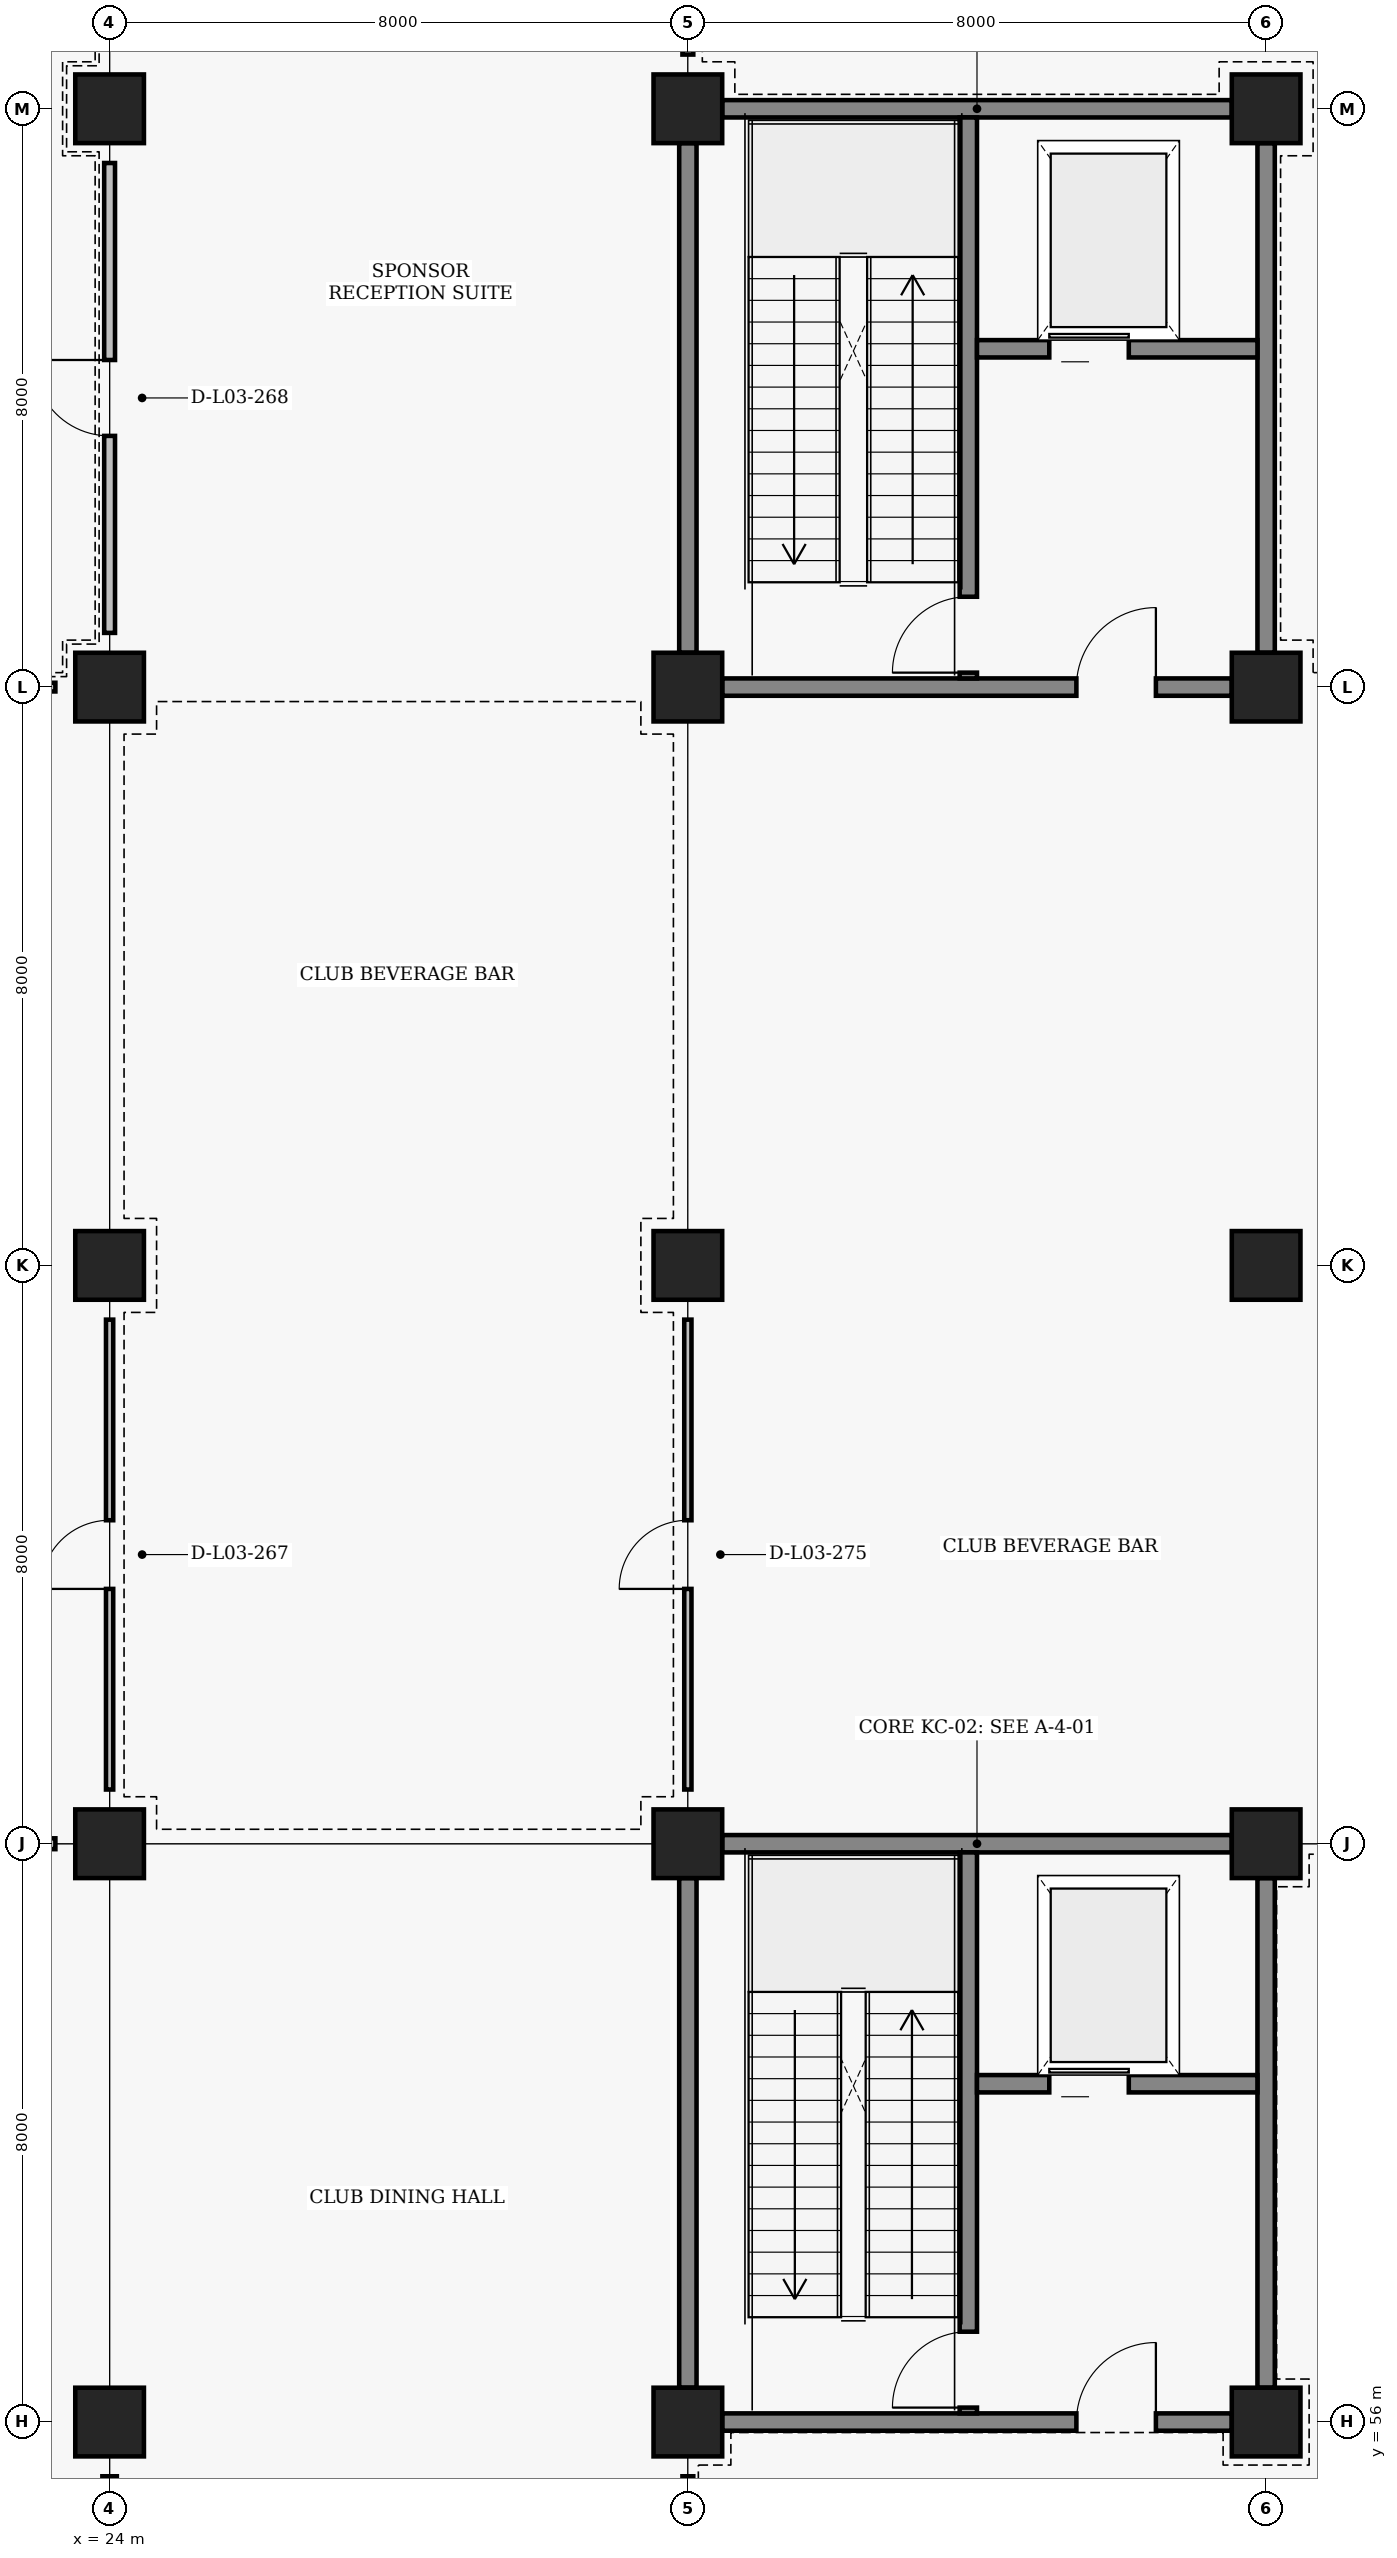
"""IFC4 building model, lengths in metres.
Left out: names, types, materials, properties, quantities, classifications, styles, units other than length and angle.
Written with IfcOpenShell. Run it as: python <this file> out.ifc"""

import sys

from ifc_helpers import new_model, si_unit, direction, frame, frame_2d, origin, origin_2d, place, context, subcontext, project, spatial, rectangle, extrude, element, fill, save


model = new_model("IFC4")
c1 = context("Model", 3, precision=1e-05, world=origin(), true_north=direction((0.0, 1.0)))
c2 = subcontext(c1, "Body", "Model", "MODEL_VIEW")
j1 = project(units=[si_unit("LENGTHUNIT", "METRE"), si_unit("PLANEANGLEUNIT", "RADIAN")], contexts=[c1])
p1 = place(None, origin())
s1 = spatial("IfcSite", under=j1, at=p1, CompositionType="ELEMENT")
p2 = place(p1, origin())
s2 = spatial("IfcBuilding", under=s1, at=p2, CompositionType="ELEMENT")
p3 = place(p2, frame((0.0, 0.0, 9.6)))
s3 = spatial("IfcBuildingStorey", under=s2, at=p3, CompositionType="ELEMENT", Elevation=9.6)
for number, where, z_axis, x_axis in (
    (1, (24.0, 56.0, 0.0), (0.0, 0.0, 1.0), (1.0, 0.0, 0.0)),
    (2, (24.0, 64.0, 0.0), (0.0, 0.0, 1.0), (1.0, 0.0, 0.0)),
    (3, (24.0, 72.0, 0.0), (0.0, 0.0, 1.0), (1.0, 0.0, 0.0)),
    (4, (24.0, 80.0, 0.0), (0.0, 0.0, 1.0), (1.0, 0.0, 0.0)),
    (5, (24.0, 88.0, 0.0), (0.0, 0.0, 1.0), (1.0, 0.0, 0.0)),
    (6, (32.0, 56.0, 0.0), (0.0, 0.0, 1.0), (1.0, 0.0, 0.0)),
    (7, (32.0, 64.0, 0.0), (0.0, 0.0, 1.0), (1.0, 0.0, 0.0)),
    (8, (32.0, 72.0, 0.0), (0.0, 0.0, 1.0), (1.0, 0.0, 0.0)),
    (9, (32.0, 80.0, 0.0), (0.0, 0.0, 1.0), (1.0, 0.0, 0.0)),
    (10, (32.0, 88.0, 0.0), (0.0, 0.0, 1.0), (1.0, 0.0, 0.0)),
    (11, (40.0, 56.0, 0.0), (0.0, 0.0, 1.0), (1.0, 0.0, 0.0)),
    (12, (40.0, 64.0, 0.0), (0.0, 0.0, 1.0), (1.0, 0.0, 0.0)),
    (13, (40.0, 72.0, 0.0), (0.0, 0.0, 1.0), (1.0, 0.0, 0.0)),
    (14, (40.0, 80.0, 0.0), (0.0, 0.0, 1.0), (1.0, 0.0, 0.0)),
    (15, (40.0, 88.0, 0.0), (0.0, 0.0, 1.0), (1.0, 0.0, 0.0)),
):
    element("IfcColumn", number, at=place(p3, frame(where, z_axis=z_axis, x_axis=x_axis)), inside=s3, PredefinedType="COLUMN", context=c2, shape_type="SweptSolid", body=[
        extrude(rectangle(XDim=0.95, YDim=0.95, at=origin_2d()), origin(), (0.0, 0.0, 1.0), 4.8),
    ])
p4 = place(p3, frame((32.475, 56.0, 0.0), z_axis=(0.0, 0.0, 1.0), x_axis=(1.0, 0.0, 0.0)))
e16 = element("IfcWall", 16, at=p4, inside=s3, PredefinedType="SHEAR", context=c2, shape_type="SweptSolid", body=[
    extrude(rectangle(XDim=7.05, YDim=0.24, at=frame_2d((3.525, 0.0))), origin(), (0.0, 0.0, 1.0), 3.93),
])
p5 = place(p4, frame((4.9, 0.0, 0.0)))
e17 = element("IfcOpeningElement", 17, at=p5, cuts=e16, PredefinedType="OPENING", context=c2, shape_type="SweptSolid", body=[
    extrude(rectangle(XDim=1.1, YDim=2.2, at=frame_2d((0.55, 1.1))), frame((0.0, 0.13, 0.0), z_axis=(0.0, -1.0, 0.0), x_axis=(1.0, 0.0, 0.0)), (0.0, 0.0, 1.0), 0.26),
])
for number, where, z_axis, x_axis in (
    (18, (32.475, 64.0, 0.0), (0.0, 0.0, 1.0), (1.0, 0.0, 0.0)),
    (19, (32.0, 56.475, 0.0), (0.0, 0.0, 1.0), (0.0, 1.0, 0.0)),
    (20, (40.0, 56.475, 0.0), (0.0, 0.0, 1.0), (0.0, 1.0, 0.0)),
):
    element("IfcWall", number, at=place(p3, frame(where, z_axis=z_axis, x_axis=x_axis)), inside=s3, PredefinedType="SHEAR", context=c2, shape_type="SweptSolid", body=[
        extrude(rectangle(XDim=7.05, YDim=0.24, at=frame_2d((3.525, 0.0))), origin(), (0.0, 0.0, 1.0), 3.93),
    ])
p6 = place(p3, frame((35.88, 56.12, 0.0), z_axis=(0.0, 0.0, 1.0), x_axis=(0.0, 1.0, 0.0)))
e21 = element("IfcWall", 21, at=p6, inside=s3, PredefinedType="SHEAR", context=c2, shape_type="SweptSolid", body=[
    extrude(rectangle(XDim=7.76, YDim=0.24, at=frame_2d((3.88, 0.0))), origin(), (0.0, 0.0, 1.0), 4.03),
])
p7 = place(p6, frame((0.08, 0.0, 0.0)))
e22 = element("IfcOpeningElement", 22, at=p7, cuts=e21, PredefinedType="OPENING", context=c2, shape_type="SweptSolid", body=[
    extrude(rectangle(XDim=1.05, YDim=2.15, at=frame_2d((0.525, 1.075))), frame((0.0, 0.13, 0.0), z_axis=(0.0, -1.0, 0.0), x_axis=(1.0, 0.0, 0.0)), (0.0, 0.0, 1.0), 0.26),
])
p8 = place(p3, frame((36.0, 60.68, 0.0), z_axis=(0.0, 0.0, 1.0), x_axis=(1.0, 0.0, 0.0)))
e23 = element("IfcWall", 23, at=p8, inside=s3, PredefinedType="SHEAR", context=c2, shape_type="SweptSolid", body=[
    extrude(rectangle(XDim=3.88, YDim=0.24, at=frame_2d((1.94, 0.0))), origin(), (0.0, 0.0, 1.0), 3.93),
])
p9 = place(p8, frame((1.0, 0.0, 0.0)))
e24 = element("IfcOpeningElement", 24, at=p9, cuts=e23, PredefinedType="OPENING", context=c2, shape_type="SweptSolid", body=[
    extrude(rectangle(XDim=1.1, YDim=2.15, at=frame_2d((0.55, 1.075))), frame((0.0, 0.13, 0.0), z_axis=(0.0, -1.0, 0.0), x_axis=(1.0, 0.0, 0.0)), (0.0, 0.0, 1.0), 0.26),
])
p10 = place(p3, frame((32.475, 80.0, 0.0), z_axis=(0.0, 0.0, 1.0), x_axis=(1.0, 0.0, 0.0)))
e25 = element("IfcWall", 25, at=p10, inside=s3, PredefinedType="SHEAR", context=c2, shape_type="SweptSolid", body=[
    extrude(rectangle(XDim=7.05, YDim=0.24, at=frame_2d((3.525, 0.0))), origin(), (0.0, 0.0, 1.0), 3.93),
])
p11 = place(p10, frame((4.9, 0.0, 0.0)))
e26 = element("IfcOpeningElement", 26, at=p11, cuts=e25, PredefinedType="OPENING", context=c2, shape_type="SweptSolid", body=[
    extrude(rectangle(XDim=1.1, YDim=2.2, at=frame_2d((0.55, 1.1))), frame((0.0, 0.13, 0.0), z_axis=(0.0, -1.0, 0.0), x_axis=(1.0, 0.0, 0.0)), (0.0, 0.0, 1.0), 0.26),
])
p12 = place(p3, frame((32.475, 88.0, 0.0), z_axis=(0.0, 0.0, 1.0), x_axis=(1.0, 0.0, 0.0)))
e27 = element("IfcWall", 27, at=p12, inside=s3, PredefinedType="SHEAR", context=c2, shape_type="SweptSolid", body=[
    extrude(rectangle(XDim=7.05, YDim=0.24, at=frame_2d((3.525, 0.0))), origin(), (0.0, 0.0, 1.0), 3.68),
])
p13 = place(p3, frame((32.0, 80.475, 0.0), z_axis=(0.0, 0.0, 1.0), x_axis=(0.0, 1.0, 0.0)))
e28 = element("IfcWall", 28, at=p13, inside=s3, PredefinedType="SHEAR", context=c2, shape_type="SweptSolid", body=[
    extrude(rectangle(XDim=7.05, YDim=0.24, at=frame_2d((3.525, 0.0))), origin(), (0.0, 0.0, 1.0), 3.93),
])
p14 = place(p3, frame((40.0, 80.475, 0.0), z_axis=(0.0, 0.0, 1.0), x_axis=(0.0, 1.0, 0.0)))
e29 = element("IfcWall", 29, at=p14, inside=s3, PredefinedType="SHEAR", context=c2, shape_type="SweptSolid", body=[
    extrude(rectangle(XDim=7.05, YDim=0.24, at=frame_2d((3.525, 0.0))), origin(), (0.0, 0.0, 1.0), 3.68),
])
p15 = place(p3, frame((35.88, 80.12, 0.0), z_axis=(0.0, 0.0, 1.0), x_axis=(0.0, 1.0, 0.0)))
e30 = element("IfcWall", 30, at=p15, inside=s3, PredefinedType="SHEAR", context=c2, shape_type="SweptSolid", body=[
    extrude(rectangle(XDim=7.76, YDim=0.24, at=frame_2d((3.88, 0.0))), origin(), (0.0, 0.0, 1.0), 4.03),
])
p16 = place(p15, frame((0.08, 0.0, 0.0)))
e31 = element("IfcOpeningElement", 31, at=p16, cuts=e30, PredefinedType="OPENING", context=c2, shape_type="SweptSolid", body=[
    extrude(rectangle(XDim=1.05, YDim=2.15, at=frame_2d((0.525, 1.075))), frame((0.0, 0.13, 0.0), z_axis=(0.0, -1.0, 0.0), x_axis=(1.0, 0.0, 0.0)), (0.0, 0.0, 1.0), 0.26),
])
p17 = place(p3, frame((36.0, 84.68, 0.0), z_axis=(0.0, 0.0, 1.0), x_axis=(1.0, 0.0, 0.0)))
e32 = element("IfcWall", 32, at=p17, inside=s3, PredefinedType="SHEAR", context=c2, shape_type="SweptSolid", body=[
    extrude(rectangle(XDim=3.88, YDim=0.24, at=frame_2d((1.94, 0.0))), origin(), (0.0, 0.0, 1.0), 3.93),
])
p18 = place(p17, frame((1.0, 0.0, 0.0)))
e33 = element("IfcOpeningElement", 33, at=p18, cuts=e32, PredefinedType="OPENING", context=c2, shape_type="SweptSolid", body=[
    extrude(rectangle(XDim=1.1, YDim=2.15, at=frame_2d((0.55, 1.075))), frame((0.0, 0.13, 0.0), z_axis=(0.0, -1.0, 0.0), x_axis=(1.0, 0.0, 0.0)), (0.0, 0.0, 1.0), 0.26),
])
p19 = place(p3, frame((24.0, 48.75, 0.0), z_axis=(0.0, 0.0, 1.0), x_axis=(0.0, 1.0, 0.0)))
e34 = element("IfcWall", 34, at=p19, inside=s3, PredefinedType="PARTITIONING", context=c2, shape_type="SweptSolid", body=[
    extrude(rectangle(XDim=6.5, YDim=0.2, at=frame_2d((3.25, 0.0))), origin(), (0.0, 0.0, 1.0), 3.93),
])
p20 = place(p3, frame((32.0, 48.75, 0.0), z_axis=(0.0, 0.0, 1.0), x_axis=(0.0, 1.0, 0.0)))
e35 = element("IfcWall", 35, at=p20, inside=s3, PredefinedType="PARTITIONING", context=c2, shape_type="SweptSolid", body=[
    extrude(rectangle(XDim=6.5, YDim=0.15, at=frame_2d((3.25, 0.0))), origin(), (0.0, 0.0, 1.0), 3.93),
])
p21 = place(p20, frame((2.35, 0.0, 0.0)))
e36 = element("IfcOpeningElement", 36, at=p21, cuts=e35, PredefinedType="OPENING", context=c2, shape_type="SweptSolid", body=[
    extrude(rectangle(XDim=1.8, YDim=2.3, at=frame_2d((0.9, 1.15))), frame((0.0, 0.085, 0.0), z_axis=(0.0, -1.0, 0.0), x_axis=(1.0, 0.0, 0.0)), (0.0, 0.0, 1.0), 0.17),
])
p22 = place(p3, frame((24.0, 64.75, 0.0), z_axis=(0.0, 0.0, 1.0), x_axis=(0.0, 1.0, 0.0)))
e37 = element("IfcWall", 37, at=p22, inside=s3, PredefinedType="PARTITIONING", context=c2, shape_type="SweptSolid", body=[
    extrude(rectangle(XDim=6.5, YDim=0.1, at=frame_2d((3.25, 0.0))), origin(), (0.0, 0.0, 1.0), 3.93),
])
p23 = place(p22, frame((2.775, 0.0, 0.0)))
e38 = element("IfcOpeningElement", 38, at=p23, cuts=e37, PredefinedType="OPENING", context=c2, shape_type="SweptSolid", body=[
    extrude(rectangle(XDim=0.95, YDim=2.1, at=frame_2d((0.475, 1.05))), frame((0.0, 0.06, 0.0), z_axis=(0.0, -1.0, 0.0), x_axis=(1.0, 0.0, 0.0)), (0.0, 0.0, 1.0), 0.12),
])
p24 = place(p3, frame((24.0, 80.75, 0.0), z_axis=(0.0, 0.0, 1.0), x_axis=(0.0, 1.0, 0.0)))
e39 = element("IfcWall", 39, at=p24, inside=s3, PredefinedType="PARTITIONING", context=c2, shape_type="SweptSolid", body=[
    extrude(rectangle(XDim=6.5, YDim=0.15, at=frame_2d((3.25, 0.0))), origin(), (0.0, 0.0, 1.0), 3.93),
])
p25 = place(p24, frame((2.725, 0.0, 0.0)))
e40 = element("IfcOpeningElement", 40, at=p25, cuts=e39, PredefinedType="OPENING", context=c2, shape_type="SweptSolid", body=[
    extrude(rectangle(XDim=1.05, YDim=2.15, at=frame_2d((0.525, 1.075))), frame((0.0, 0.085, 0.0), z_axis=(0.0, -1.0, 0.0), x_axis=(1.0, 0.0, 0.0)), (0.0, 0.0, 1.0), 0.17),
])
p26 = place(p3, frame((32.0, 64.75, 0.0), z_axis=(0.0, 0.0, 1.0), x_axis=(0.0, 1.0, 0.0)))
e41 = element("IfcWall", 41, at=p26, inside=s3, PredefinedType="PARTITIONING", context=c2, shape_type="SweptSolid", body=[
    extrude(rectangle(XDim=6.5, YDim=0.1, at=frame_2d((3.25, 0.0))), origin(), (0.0, 0.0, 1.0), 3.93),
])
p27 = place(p26, frame((2.775, 0.0, 0.0)))
e42 = element("IfcOpeningElement", 42, at=p27, cuts=e41, PredefinedType="OPENING", context=c2, shape_type="SweptSolid", body=[
    extrude(rectangle(XDim=0.95, YDim=2.1, at=frame_2d((0.475, 1.05))), frame((0.0, 0.06, 0.0), z_axis=(0.0, -1.0, 0.0), x_axis=(1.0, 0.0, 0.0)), (0.0, 0.0, 1.0), 0.12),
])
p28 = place(p3, frame((32.0, 88.75, 0.0), z_axis=(0.0, 0.0, 1.0), x_axis=(0.0, 1.0, 0.0)))
e43 = element("IfcWall", 43, at=p28, inside=s3, PredefinedType="PARTITIONING", context=c2, shape_type="SweptSolid", body=[
    extrude(rectangle(XDim=6.5, YDim=0.15, at=frame_2d((3.25, 0.0))), origin(), (0.0, 0.0, 1.0), 3.93),
])
p29 = place(p28, frame((2.725, 0.0, 0.0)))
e44 = element("IfcOpeningElement", 44, at=p29, cuts=e43, PredefinedType="OPENING", context=c2, shape_type="SweptSolid", body=[
    extrude(rectangle(XDim=1.05, YDim=2.15, at=frame_2d((0.525, 1.075))), frame((0.0, 0.085, 0.0), z_axis=(0.0, -1.0, 0.0), x_axis=(1.0, 0.0, 0.0)), (0.0, 0.0, 1.0), 0.17),
])
p30 = place(p3, frame((16.75, 64.0, 0.0), z_axis=(0.0, 0.0, 1.0), x_axis=(1.0, 0.0, 0.0)))
e45 = element("IfcWall", 45, at=p30, inside=s3, PredefinedType="PARTITIONING", context=c2, shape_type="SweptSolid", body=[
    extrude(rectangle(XDim=6.5, YDim=0.15, at=frame_2d((3.25, 0.0))), origin(), (0.0, 0.0, 1.0), 3.97),
])
p31 = place(p30, frame((2.675, 0.0, 0.0)))
e46 = element("IfcOpeningElement", 46, at=p31, cuts=e45, PredefinedType="OPENING", context=c2, shape_type="SweptSolid", body=[
    extrude(rectangle(XDim=1.15, YDim=2.15, at=frame_2d((0.575, 1.075))), frame((0.0, 0.085, 0.0), z_axis=(0.0, -1.0, 0.0), x_axis=(1.0, 0.0, 0.0)), (0.0, 0.0, 1.0), 0.17),
])
p32 = place(p3, frame((16.75, 80.0, 0.0), z_axis=(0.0, 0.0, 1.0), x_axis=(1.0, 0.0, 0.0)))
e47 = element("IfcWall", 47, at=p32, inside=s3, PredefinedType="PARTITIONING", context=c2, shape_type="SweptSolid", body=[
    extrude(rectangle(XDim=6.5, YDim=0.12, at=frame_2d((3.25, 0.0))), origin(), (0.0, 0.0, 1.0), 3.97),
])
p33 = place(p32, frame((2.75, 0.0, 0.0)))
e48 = element("IfcOpeningElement", 48, at=p33, cuts=e47, PredefinedType="OPENING", context=c2, shape_type="SweptSolid", body=[
    extrude(rectangle(XDim=1.0, YDim=2.1, at=frame_2d((0.5, 1.05))), frame((0.0, 0.07, 0.0), z_axis=(0.0, -1.0, 0.0), x_axis=(1.0, 0.0, 0.0)), (0.0, 0.0, 1.0), 0.14),
])
p34 = place(p5, origin())
e49 = element("IfcDoor", 49, at=p34, inside=s3, OperationType="SINGLE_SWING_RIGHT", PredefinedType="DOOR", context=c2, shape_type="SweptSolid", body=[
    extrude(rectangle(XDim=1.1, YDim=2.2, at=frame_2d((0.55, 1.1))), frame((0.0, 0.025, 0.0), z_axis=(0.0, -1.0, 0.0), x_axis=(1.0, 0.0, 0.0)), (0.0, 0.0, 1.0), 0.05),
])
fill(e17, e49)
p35 = place(p7, origin())
e50 = element("IfcDoor", 50, at=p35, inside=s3, OperationType="SINGLE_SWING_LEFT", PredefinedType="DOOR", context=c2, shape_type="SweptSolid", body=[
    extrude(rectangle(XDim=1.05, YDim=2.15, at=frame_2d((0.525, 1.075))), frame((0.0, 0.025, 0.0), z_axis=(0.0, -1.0, 0.0), x_axis=(1.0, 0.0, 0.0)), (0.0, 0.0, 1.0), 0.05),
])
fill(e22, e50)
p36 = place(p9, origin())
e51 = element("IfcDoor", 51, at=p36, inside=s3, OperationType="SLIDING_TO_LEFT", PredefinedType="DOOR", context=c2, shape_type="SweptSolid", body=[
    extrude(rectangle(XDim=1.1, YDim=2.15, at=frame_2d((0.55, 1.075))), frame((0.0, 0.025, 0.0), z_axis=(0.0, -1.0, 0.0), x_axis=(1.0, 0.0, 0.0)), (0.0, 0.0, 1.0), 0.05),
])
fill(e24, e51)
p37 = place(p11, origin())
e52 = element("IfcDoor", 52, at=p37, inside=s3, OperationType="SINGLE_SWING_RIGHT", PredefinedType="DOOR", context=c2, shape_type="SweptSolid", body=[
    extrude(rectangle(XDim=1.1, YDim=2.2, at=frame_2d((0.55, 1.1))), frame((0.0, 0.025, 0.0), z_axis=(0.0, -1.0, 0.0), x_axis=(1.0, 0.0, 0.0)), (0.0, 0.0, 1.0), 0.05),
])
fill(e26, e52)
p38 = place(p16, origin())
e53 = element("IfcDoor", 53, at=p38, inside=s3, OperationType="SINGLE_SWING_LEFT", PredefinedType="DOOR", context=c2, shape_type="SweptSolid", body=[
    extrude(rectangle(XDim=1.05, YDim=2.15, at=frame_2d((0.525, 1.075))), frame((0.0, 0.025, 0.0), z_axis=(0.0, -1.0, 0.0), x_axis=(1.0, 0.0, 0.0)), (0.0, 0.0, 1.0), 0.05),
])
fill(e31, e53)
p39 = place(p18, origin())
e54 = element("IfcDoor", 54, at=p39, inside=s3, OperationType="SLIDING_TO_LEFT", PredefinedType="DOOR", context=c2, shape_type="SweptSolid", body=[
    extrude(rectangle(XDim=1.1, YDim=2.15, at=frame_2d((0.55, 1.075))), frame((0.0, 0.025, 0.0), z_axis=(0.0, -1.0, 0.0), x_axis=(1.0, 0.0, 0.0)), (0.0, 0.0, 1.0), 0.05),
])
fill(e33, e54)
p40 = place(p23, origin())
e55 = element("IfcDoor", 55, at=p40, inside=s3, OperationType="SINGLE_SWING_LEFT", PredefinedType="DOOR", context=c2, shape_type="SweptSolid", body=[
    extrude(rectangle(XDim=0.95, YDim=2.1, at=frame_2d((0.475, 1.05))), frame((0.0, 0.025, 0.0), z_axis=(0.0, -1.0, 0.0), x_axis=(1.0, 0.0, 0.0)), (0.0, 0.0, 1.0), 0.05),
])
fill(e38, e55)
p41 = place(p25, origin())
e56 = element("IfcDoor", 56, at=p41, inside=s3, OperationType="SINGLE_SWING_RIGHT", PredefinedType="DOOR", context=c2, shape_type="SweptSolid", body=[
    extrude(rectangle(XDim=1.05, YDim=2.15, at=frame_2d((0.525, 1.075))), frame((0.0, 0.025, 0.0), z_axis=(0.0, -1.0, 0.0), x_axis=(1.0, 0.0, 0.0)), (0.0, 0.0, 1.0), 0.05),
])
fill(e40, e56)
p42 = place(p27, origin())
e57 = element("IfcDoor", 57, at=p42, inside=s3, OperationType="SINGLE_SWING_LEFT", PredefinedType="DOOR", context=c2, shape_type="SweptSolid", body=[
    extrude(rectangle(XDim=0.95, YDim=2.1, at=frame_2d((0.475, 1.05))), frame((0.0, 0.025, 0.0), z_axis=(0.0, -1.0, 0.0), x_axis=(1.0, 0.0, 0.0)), (0.0, 0.0, 1.0), 0.05),
])
fill(e42, e57)
save(model, sys.argv[1])
